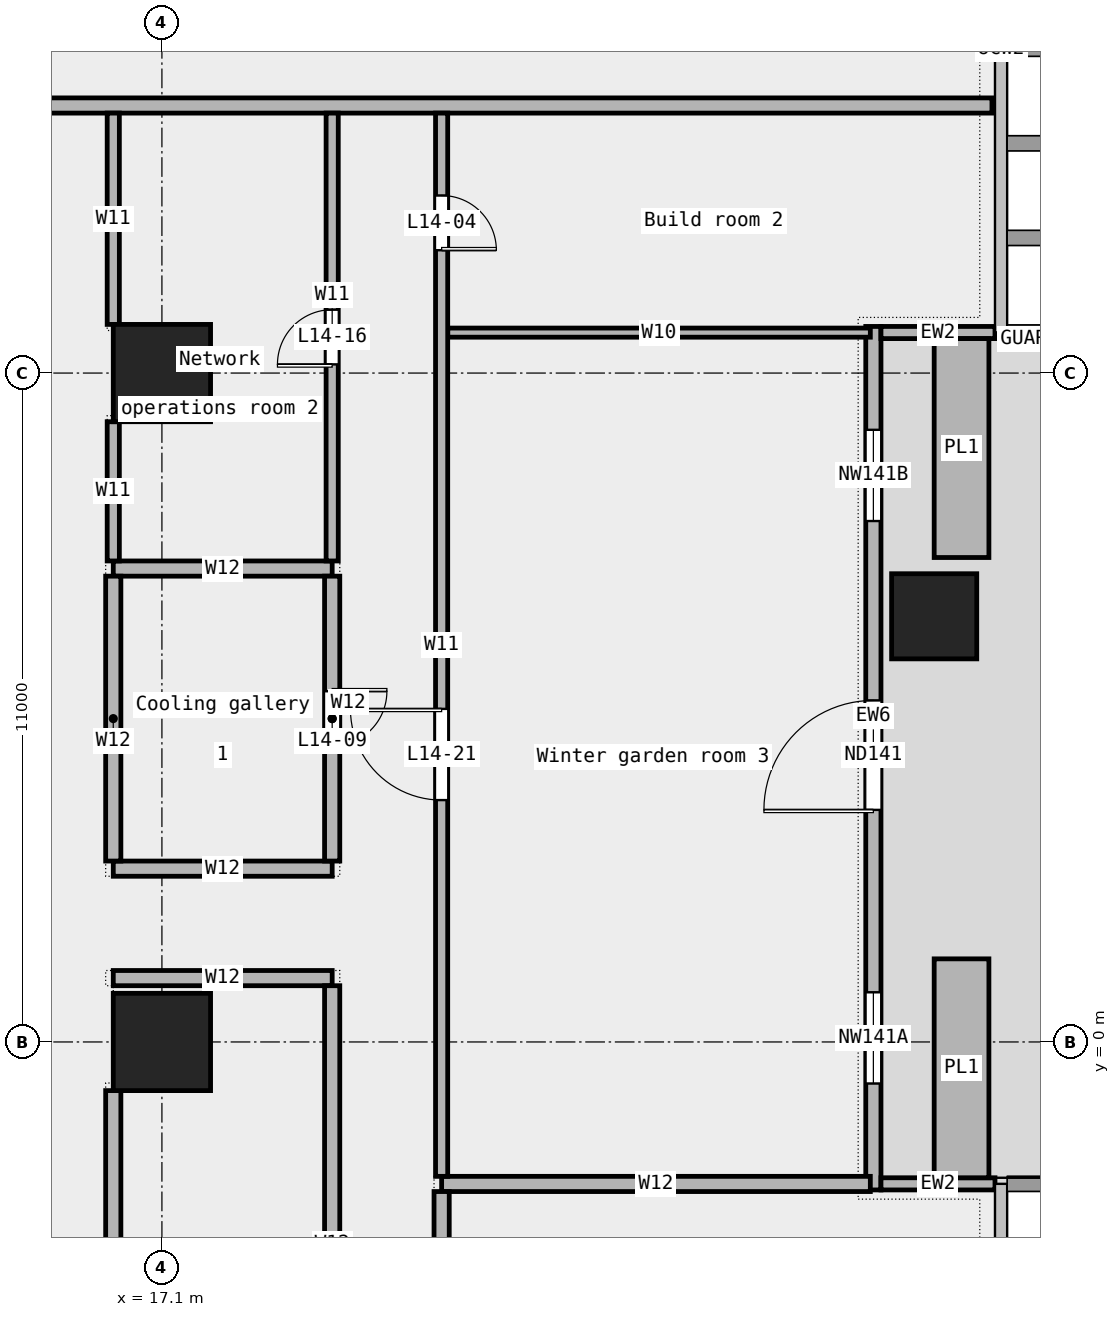
"""IFC4 building model, lengths in metres.
Left out: names, types, materials, properties, quantities, classifications, styles, units other than length and angle.
Written with IfcOpenShell. Run it as: python <this file> out.ifc"""

import sys

from ifc_helpers import new_model, si_unit, direction, frame, frame_2d, origin, origin_2d, place, context, subcontext, project, spatial, rectangle, extrude, element, fill, save


model = new_model("IFC4")
c1 = context("Model", 3, precision=1e-05, world=origin(), true_north=direction((0.0, 1.0)))
c2 = subcontext(c1, "Body", "Model", "MODEL_VIEW")
j1 = project(units=[si_unit("LENGTHUNIT", "METRE"), si_unit("PLANEANGLEUNIT", "RADIAN")], contexts=[c1])
p1 = place(None, origin())
s1 = spatial("IfcSite", under=j1, at=p1, CompositionType="ELEMENT")
p2 = place(p1, origin())
s2 = spatial("IfcBuilding", under=s1, at=p2, CompositionType="ELEMENT")
p3 = place(p2, frame((0.0, 0.0, 74.2)))
s3 = spatial("IfcBuildingStorey", under=s2, at=p3, CompositionType="ELEMENT", Elevation=74.2)
p4 = place(p3, frame((29.8, 7.0, 0.0), z_axis=(0.0, 0.0, 1.0), x_axis=(1.0, 0.0, 0.0)))
e1 = element("IfcColumn", 1, at=p4, inside=s3, PredefinedType="COLUMN", context=c2, shape_type="SweptSolid", body=[
    extrude(rectangle(XDim=1.4, YDim=1.4, at=origin_2d()), origin(), (0.0, 0.0, 1.0), 4.35),
])
for number, where, z_axis, x_axis in (
    (2, (17.1, 0.0, 0.0), (0.0, 0.0, 1.0), (1.0, 0.0, 0.0)),
    (3, (17.1, 11.0, 0.0), (0.0, 0.0, 1.0), (1.0, 0.0, 0.0)),
):
    element("IfcColumn", number, at=place(p3, frame(where, z_axis=z_axis, x_axis=x_axis)), inside=s3, PredefinedType="COLUMN", context=c2, shape_type="SweptSolid", body=[
        extrude(rectangle(XDim=1.6, YDim=1.6, at=origin_2d()), origin(), (0.0, 0.0, 1.0), 4.35),
    ])
p5 = place(p3, frame((28.8, -2.433, 0.0), z_axis=(0.0, 0.0, 1.0), x_axis=(0.0, 1.0, 0.0)))
e4 = element("IfcWall", 4, at=p5, inside=s3, PredefinedType="STANDARD", context=c2, shape_type="SweptSolid", body=[
    extrude(rectangle(XDim=14.2, YDim=0.25, at=frame_2d((7.1, 0.0))), origin(), (0.0, 0.0, 1.0), 4.35),
])
p6 = place(p5, frame((1.75, 0.0, 0.45)))
e5 = element("IfcOpeningElement", 5, at=p6, cuts=e4, PredefinedType="OPENING", context=c2, shape_type="SweptSolid", body=[
    extrude(rectangle(XDim=1.5, YDim=3.0, at=frame_2d((0.75, 1.5))), frame((0.0, 0.137, 0.0), z_axis=(0.0, -1.0, 0.0), x_axis=(1.0, 0.0, 0.0)), (0.0, 0.0, 1.0), 0.274),
])
p7 = place(p5, frame((6.25, 0.0, 0.0)))
e6 = element("IfcOpeningElement", 6, at=p7, cuts=e4, PredefinedType="OPENING", context=c2, shape_type="SweptSolid", body=[
    extrude(rectangle(XDim=1.8, YDim=2.4, at=frame_2d((0.9, 1.2))), frame((0.0, 0.137, 0.0), z_axis=(0.0, -1.0, 0.0), x_axis=(1.0, 0.0, 0.0)), (0.0, 0.0, 1.0), 0.274),
])
p8 = place(p5, frame((11.0, 0.0, 0.45)))
e7 = element("IfcOpeningElement", 7, at=p8, cuts=e4, PredefinedType="OPENING", context=c2, shape_type="SweptSolid", body=[
    extrude(rectangle(XDim=1.5, YDim=3.0, at=frame_2d((0.75, 1.5))), frame((0.0, 0.137, 0.0), z_axis=(0.0, -1.0, 0.0), x_axis=(1.0, 0.0, 0.0)), (0.0, 0.0, 1.0), 0.274),
])
for number, where, z_axis, x_axis in (
    (8, (30.8, -2.333, 0.0), (0.0, 0.0, 1.0), (-1.0, 0.0, 0.0)),
    (9, (30.8, 11.667, 0.0), (0.0, 0.0, 1.0), (-1.0, 0.0, 0.0)),
):
    element("IfcWall", number, at=place(p3, frame(where, z_axis=z_axis, x_axis=x_axis)), inside=s3, PredefinedType="STANDARD", context=c2, shape_type="SweptSolid", body=[
        extrude(rectangle(XDim=1.875, YDim=0.2, at=frame_2d((0.938, 0.0))), origin(), (0.0, 0.0, 1.0), 4.35),
    ])
for number, where, z_axis, x_axis in (
    (10, (30.25, -2.233, 0.0), (0.0, 0.0, 1.0), (0.0, 1.0, 0.0)),
    (11, (30.25, 7.967, 0.0), (0.0, 0.0, 1.0), (0.0, 1.0, 0.0)),
):
    element("IfcWall", number, at=place(p3, frame(where, z_axis=z_axis, x_axis=x_axis)), inside=s3, PredefinedType="STANDARD", context=c2, shape_type="SweptSolid", body=[
        extrude(rectangle(XDim=3.6, YDim=0.9, at=frame_2d((1.8, 0.0))), origin(), (0.0, 0.0, 1.0), 0.7),
    ])
p9 = place(p3, frame((21.7, -2.335, 0.0), z_axis=(0.0, 0.0, 1.0), x_axis=(1.0, 0.0, 0.0)))
e12 = element("IfcWall", 12, at=p9, inside=s3, PredefinedType="PARTITIONING", context=c2, shape_type="SweptSolid", body=[
    extrude(rectangle(XDim=7.05, YDim=0.25, at=frame_2d((3.525, 0.0))), origin(), (0.0, 0.0, 1.0), 4.35),
])
for number, where, z_axis, x_axis in (
    (13, (16.3, 1.05, 0.0), (0.0, 0.0, 1.0), (1.0, 0.0, 0.0)),
    (14, (16.3, 2.85, 0.0), (0.0, 0.0, 1.0), (1.0, 0.0, 0.0)),
    (15, (16.3, 7.785, 0.0), (0.0, 0.0, 1.0), (1.0, 0.0, 0.0)),
):
    element("IfcWall", number, at=place(p3, frame(where, z_axis=z_axis, x_axis=x_axis)), inside=s3, PredefinedType="PARTITIONING", context=c2, shape_type="SweptSolid", body=[
        extrude(rectangle(XDim=3.6, YDim=0.25, at=frame_2d((1.8, 0.0))), origin(), (0.0, 0.0, 1.0), 4.35),
    ])
p10 = place(p3, frame((21.8, 11.665, 0.0), z_axis=(0.0, 0.0, 1.0), x_axis=(1.0, 0.0, 0.0)))
e16 = element("IfcWall", 16, at=p10, inside=s3, PredefinedType="PARTITIONING", context=c2, shape_type="SweptSolid", body=[
    extrude(rectangle(XDim=6.95, YDim=0.15, at=frame_2d((3.475, 0.0))), origin(), (0.0, 0.0, 1.0), 4.35),
])
p11 = place(p3, frame((-2.255, 15.4, 0.0), z_axis=(0.0, 0.0, 1.0), x_axis=(1.0, 0.0, 0.0)))
e17 = element("IfcWall", 17, at=p11, inside=s3, PredefinedType="PARTITIONING", context=c2, shape_type="SweptSolid", body=[
    extrude(rectangle(XDim=33.005, YDim=0.25, at=frame_2d((16.502, 0.0))), origin(), (0.0, 0.0, 1.0), 4.35),
])
p12 = place(p11, frame((11.498, 0.0, 0.0)))
e18 = element("IfcOpeningElement", 18, at=p12, cuts=e17, PredefinedType="OPENING", context=c2, shape_type="SweptSolid", body=[
    extrude(rectangle(XDim=1.8, YDim=2.1, at=frame_2d((0.9, 1.05))), frame((0.0, 0.137, 0.0), z_axis=(0.0, -1.0, 0.0), x_axis=(1.0, 0.0, 0.0)), (0.0, 0.0, 1.0), 0.274),
])
p13 = place(p11, frame((2.52, 0.0, 0.0)))
e19 = element("IfcOpeningElement", 19, at=p13, cuts=e17, PredefinedType="OPENING", context=c2, shape_type="SweptSolid", body=[
    extrude(rectangle(XDim=1.2, YDim=2.1, at=frame_2d((0.6, 1.05))), frame((0.0, 0.137, 0.0), z_axis=(0.0, -1.0, 0.0), x_axis=(1.0, 0.0, 0.0)), (0.0, 0.0, 1.0), 0.274),
])
p14 = place(p3, frame((16.3, 7.91, 0.0), z_axis=(0.0, 0.0, 1.0), x_axis=(0.0, 1.0, 0.0)))
e20 = element("IfcWall", 20, at=p14, inside=s3, PredefinedType="PARTITIONING", context=c2, shape_type="SweptSolid", body=[
    extrude(rectangle(XDim=2.29, YDim=0.2, at=frame_2d((1.145, 0.0))), origin(), (0.0, 0.0, 1.0), 4.35),
])
p15 = place(p3, frame((16.3, 11.8, 0.0), z_axis=(0.0, 0.0, 1.0), x_axis=(0.0, 1.0, 0.0)))
e21 = element("IfcWall", 21, at=p15, inside=s3, PredefinedType="PARTITIONING", context=c2, shape_type="SweptSolid", body=[
    extrude(rectangle(XDim=3.475, YDim=0.2, at=frame_2d((1.737, 0.0))), origin(), (0.0, 0.0, 1.0), 4.35),
])
p16 = place(p3, frame((16.3, -8.95, 0.0), z_axis=(0.0, 0.0, 1.0), x_axis=(0.0, 1.0, 0.0)))
e22 = element("IfcWall", 22, at=p16, inside=s3, PredefinedType="PARTITIONING", context=c2, shape_type="SweptSolid", body=[
    extrude(rectangle(XDim=8.15, YDim=0.25, at=frame_2d((4.075, 0.0))), origin(), (0.0, 0.0, 1.0), 4.35),
])
p17 = place(p3, frame((16.3, 2.975, 0.0), z_axis=(0.0, 0.0, 1.0), x_axis=(0.0, 1.0, 0.0)))
e23 = element("IfcWall", 23, at=p17, inside=s3, PredefinedType="PARTITIONING", context=c2, shape_type="SweptSolid", body=[
    extrude(rectangle(XDim=4.685, YDim=0.25, at=frame_2d((2.342, 0.0))), origin(), (0.0, 0.0, 1.0), 4.35),
])
p18 = place(p3, frame((19.9, 7.91, 0.0), z_axis=(0.0, 0.0, 1.0), x_axis=(0.0, 1.0, 0.0)))
e24 = element("IfcWall", 24, at=p18, inside=s3, PredefinedType="PARTITIONING", context=c2, shape_type="SweptSolid", body=[
    extrude(rectangle(XDim=7.365, YDim=0.2, at=frame_2d((3.683, 0.0))), origin(), (0.0, 0.0, 1.0), 4.35),
])
p19 = place(p18, frame((3.232, 0.0, 0.0)))
e25 = element("IfcOpeningElement", 25, at=p19, cuts=e24, PredefinedType="OPENING", context=c2, shape_type="SweptSolid", body=[
    extrude(rectangle(XDim=0.9, YDim=2.1, at=frame_2d((0.45, 1.05))), frame((0.0, 0.112, 0.0), z_axis=(0.0, -1.0, 0.0), x_axis=(1.0, 0.0, 0.0)), (0.0, 0.0, 1.0), 0.224),
])
p20 = place(p3, frame((19.9, -8.95, 0.0), z_axis=(0.0, 0.0, 1.0), x_axis=(0.0, 1.0, 0.0)))
e26 = element("IfcWall", 26, at=p20, inside=s3, PredefinedType="PARTITIONING", context=c2, shape_type="SweptSolid", body=[
    extrude(rectangle(XDim=9.875, YDim=0.25, at=frame_2d((4.938, 0.0))), origin(), (0.0, 0.0, 1.0), 4.35),
])
p21 = place(p20, frame((4.488, 0.0, 0.0)))
e27 = element("IfcOpeningElement", 27, at=p21, cuts=e26, PredefinedType="OPENING", context=c2, shape_type="SweptSolid", body=[
    extrude(rectangle(XDim=0.9, YDim=2.1, at=frame_2d((0.45, 1.05))), frame((0.0, 0.137, 0.0), z_axis=(0.0, -1.0, 0.0), x_axis=(1.0, 0.0, 0.0)), (0.0, 0.0, 1.0), 0.274),
])
p22 = place(p3, frame((19.9, 2.975, 0.0), z_axis=(0.0, 0.0, 1.0), x_axis=(0.0, 1.0, 0.0)))
e28 = element("IfcWall", 28, at=p22, inside=s3, PredefinedType="PARTITIONING", context=c2, shape_type="SweptSolid", body=[
    extrude(rectangle(XDim=4.685, YDim=0.25, at=frame_2d((2.342, 0.0))), origin(), (0.0, 0.0, 1.0), 4.35),
])
p23 = place(p22, frame((1.893, 0.0, 0.0)))
e29 = element("IfcOpeningElement", 29, at=p23, cuts=e28, PredefinedType="OPENING", context=c2, shape_type="SweptSolid", body=[
    extrude(rectangle(XDim=0.9, YDim=2.1, at=frame_2d((0.45, 1.05))), frame((0.0, 0.137, 0.0), z_axis=(0.0, -1.0, 0.0), x_axis=(1.0, 0.0, 0.0)), (0.0, 0.0, 1.0), 0.274),
])
p24 = place(p3, frame((21.7, -2.21, 0.0), z_axis=(0.0, 0.0, 1.0), x_axis=(0.0, 1.0, 0.0)))
e30 = element("IfcWall", 30, at=p24, inside=s3, PredefinedType="PARTITIONING", context=c2, shape_type="SweptSolid", body=[
    extrude(rectangle(XDim=17.485, YDim=0.2, at=frame_2d((8.742, 0.0))), origin(), (0.0, 0.0, 1.0), 4.35),
])
p25 = place(p24, frame((15.23, 0.0, 0.0)))
e31 = element("IfcOpeningElement", 31, at=p25, cuts=e30, PredefinedType="OPENING", context=c2, shape_type="SweptSolid", body=[
    extrude(rectangle(XDim=0.9, YDim=2.1, at=frame_2d((0.45, 1.05))), frame((0.0, 0.112, 0.0), z_axis=(0.0, -1.0, 0.0), x_axis=(1.0, 0.0, 0.0)), (0.0, 0.0, 1.0), 0.224),
])
p26 = place(p24, frame((6.188, 0.0, 0.0)))
e32 = element("IfcOpeningElement", 32, at=p26, cuts=e30, PredefinedType="OPENING", context=c2, shape_type="SweptSolid", body=[
    extrude(rectangle(XDim=1.5, YDim=2.1, at=frame_2d((0.75, 1.05))), frame((0.0, 0.112, 0.0), z_axis=(0.0, -1.0, 0.0), x_axis=(1.0, 0.0, 0.0)), (0.0, 0.0, 1.0), 0.224),
])
p27 = place(p3, frame((21.7, -8.95, 0.0), z_axis=(0.0, 0.0, 1.0), x_axis=(0.0, 1.0, 0.0)))
e33 = element("IfcWall", 33, at=p27, inside=s3, PredefinedType="PARTITIONING", context=c2, shape_type="SweptSolid", body=[
    extrude(rectangle(XDim=6.49, YDim=0.25, at=frame_2d((3.245, 0.0))), origin(), (0.0, 0.0, 1.0), 4.35),
])
p28 = place(p27, frame((2.645, 0.0, 0.0)))
e34 = element("IfcOpeningElement", 34, at=p28, cuts=e33, PredefinedType="OPENING", context=c2, shape_type="SweptSolid", body=[
    extrude(rectangle(XDim=1.2, YDim=2.1, at=frame_2d((0.6, 1.05))), frame((0.0, 0.137, 0.0), z_axis=(0.0, -1.0, 0.0), x_axis=(1.0, 0.0, 0.0)), (0.0, 0.0, 1.0), 0.274),
])
p29 = place(p6, origin())
e35 = element("IfcWindow", 35, at=p29, inside=s3, PartitioningType="SINGLE_PANEL", PredefinedType="WINDOW", context=c2, shape_type="SweptSolid", body=[
    extrude(rectangle(XDim=1.5, YDim=3.0, at=frame_2d((0.75, 1.5))), frame((0.0, 0.03, 0.0), z_axis=(0.0, -1.0, 0.0), x_axis=(1.0, 0.0, 0.0)), (0.0, 0.0, 1.0), 0.06),
])
fill(e5, e35)
p30 = place(p7, origin())
e36 = element("IfcDoor", 36, at=p30, inside=s3, OperationType="DOUBLE_DOOR_SINGLE_SWING", PredefinedType="DOOR", context=c2, shape_type="SweptSolid", body=[
    extrude(rectangle(XDim=1.8, YDim=2.4, at=frame_2d((0.9, 1.2))), frame((0.0, 0.025, 0.0), z_axis=(0.0, -1.0, 0.0), x_axis=(1.0, 0.0, 0.0)), (0.0, 0.0, 1.0), 0.05),
])
fill(e6, e36)
p31 = place(p8, origin())
e37 = element("IfcWindow", 37, at=p31, inside=s3, PartitioningType="SINGLE_PANEL", PredefinedType="WINDOW", context=c2, shape_type="SweptSolid", body=[
    extrude(rectangle(XDim=1.5, YDim=3.0, at=frame_2d((0.75, 1.5))), frame((0.0, 0.03, 0.0), z_axis=(0.0, -1.0, 0.0), x_axis=(1.0, 0.0, 0.0)), (0.0, 0.0, 1.0), 0.06),
])
fill(e7, e37)
p32 = place(p25, origin())
e38 = element("IfcDoor", 38, at=p32, inside=s3, OperationType="SINGLE_SWING_RIGHT", PredefinedType="DOOR", context=c2, shape_type="SweptSolid", body=[
    extrude(rectangle(XDim=0.9, YDim=2.1, at=frame_2d((0.45, 1.05))), frame((0.0, 0.025, 0.0), z_axis=(0.0, -1.0, 0.0), x_axis=(1.0, 0.0, 0.0)), (0.0, 0.0, 1.0), 0.05),
])
fill(e31, e38)
p33 = place(p23, origin())
e39 = element("IfcDoor", 39, at=p33, inside=s3, OperationType="SINGLE_SWING_LEFT", PredefinedType="DOOR", context=c2, shape_type="SweptSolid", body=[
    extrude(rectangle(XDim=0.9, YDim=2.1, at=frame_2d((0.45, 1.05))), frame((0.0, 0.025, 0.0), z_axis=(0.0, -1.0, 0.0), x_axis=(1.0, 0.0, 0.0)), (0.0, 0.0, 1.0), 0.05),
])
fill(e29, e39)
p34 = place(p19, origin())
e40 = element("IfcDoor", 40, at=p34, inside=s3, OperationType="SINGLE_SWING_LEFT", PredefinedType="DOOR", context=c2, shape_type="SweptSolid", body=[
    extrude(rectangle(XDim=0.9, YDim=2.1, at=frame_2d((0.45, 1.05))), frame((0.0, 0.025, 0.0), z_axis=(0.0, -1.0, 0.0), x_axis=(1.0, 0.0, 0.0)), (0.0, 0.0, 1.0), 0.05),
])
fill(e25, e40)
p35 = place(p26, origin())
e41 = element("IfcDoor", 41, at=p35, inside=s3, OperationType="DOUBLE_DOOR_SINGLE_SWING", PredefinedType="DOOR", context=c2, shape_type="SweptSolid", body=[
    extrude(rectangle(XDim=1.5, YDim=2.1, at=frame_2d((0.75, 1.05))), frame((0.0, 0.025, 0.0), z_axis=(0.0, -1.0, 0.0), x_axis=(1.0, 0.0, 0.0)), (0.0, 0.0, 1.0), 0.05),
])
fill(e32, e41)
save(model, sys.argv[1])
